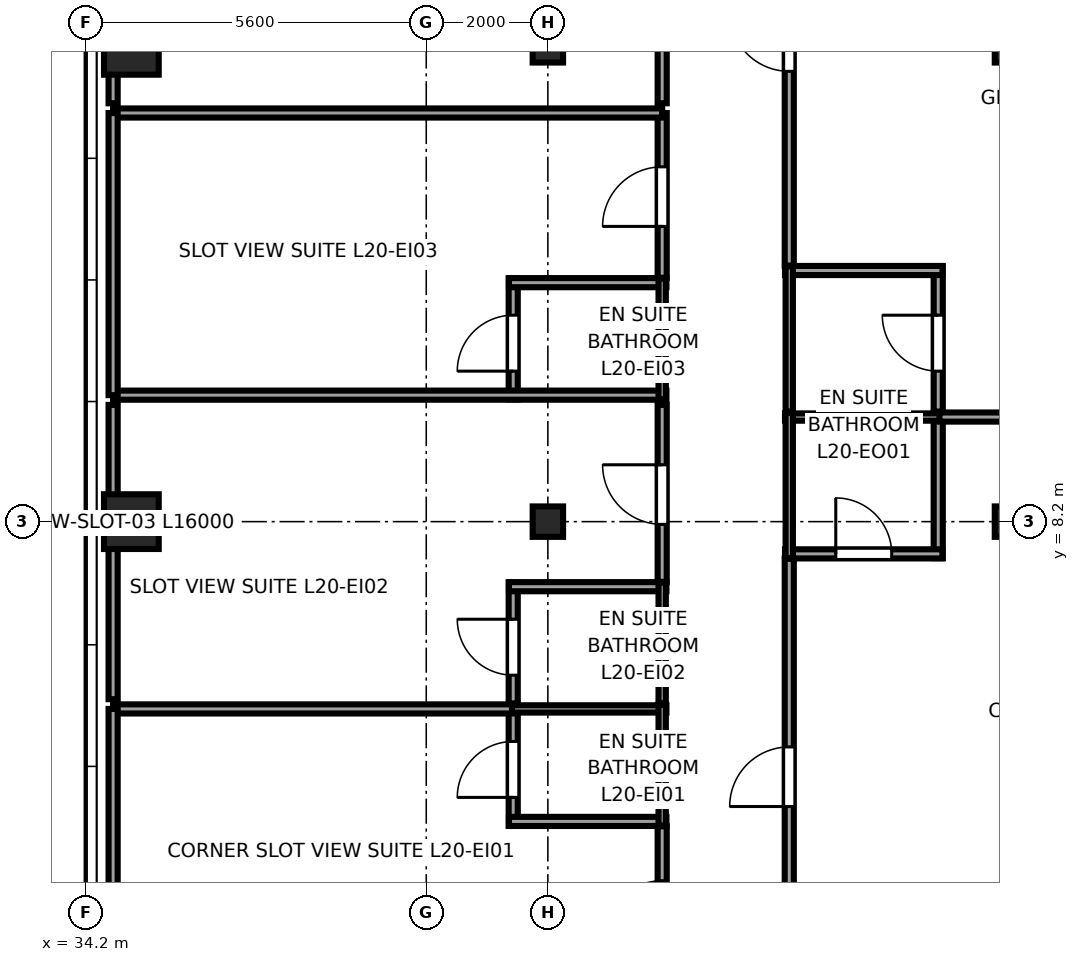
"""IFC4 building model, lengths in metres.
Left out: names, types, materials, properties, quantities, classifications, styles, units other than length and angle.
Written with IfcOpenShell. Run it as: python <this file> out.ifc"""

import sys

from ifc_helpers import new_model, si_unit, direction, frame, frame_2d, origin, origin_2d, place, context, subcontext, project, spatial, rectangle, i_section, extrude, source, transform, mapped, element, fill, save


model = new_model("IFC4")
c1 = context("Model", 3, precision=1e-05, world=origin(), true_north=direction((0.0, 1.0)))
c2 = subcontext(c1, "Body", "Model", "MODEL_VIEW")
j1 = project(units=[si_unit("LENGTHUNIT", "METRE"), si_unit("PLANEANGLEUNIT", "RADIAN")], contexts=[c1])
p1 = place(None, origin())
s1 = spatial("IfcSite", under=j1, at=p1, CompositionType="ELEMENT")
p2 = place(p1, origin())
s2 = spatial("IfcBuilding", under=s1, at=p2, CompositionType="ELEMENT")
p3 = place(p2, frame((0.0, 0.0, 81.7)))
s3 = spatial("IfcBuildingStorey", under=s2, at=p3, CompositionType="ELEMENT", Elevation=81.7)
m1 = source(origin(), c2, "Body", "SweptSolid", [
    extrude(rectangle(XDim=0.9, YDim=0.9, at=origin_2d()), origin(), (0.0, 0.0, 1.0), 3.55),
])
for number, where, z_axis, x_axis in (
    (1, (34.95, 8.2, 0.0), (0.0, 0.0, 1.0), (1.0, 0.0, 0.0)),
    (2, (34.95, 16.0, 0.0), (0.0, 0.0, 1.0), (1.0, 0.0, 0.0)),
):
    element("IfcColumn", number, at=place(p3, frame(where, z_axis=z_axis, x_axis=x_axis)), inside=s3, PredefinedType="COLUMN", context=c2, shape_type="MappedRepresentation", body=[
        mapped(m1, transform((0.0, 0.0, 0.0), x_axis=(1.0, 0.0, 0.0), y_axis=(0.0, 1.0, 0.0), z_axis=(0.0, 0.0, 1.0), scale=1.0)),
    ])
m2 = source(origin(), c2, "Body", "SweptSolid", [
    extrude(i_section(OverallWidth=0.5, OverallDepth=0.5, WebThickness=0.022, FlangeThickness=0.034, at=origin_2d()), origin(), (0.0, 0.0, 1.0), 3.55),
])
for number, where, z_axis, x_axis in (
    (3, (41.8, 8.2, 0.0), (0.0, 0.0, 1.0), (1.0, 0.0, 0.0)),
    (4, (41.8, 16.0, 0.0), (0.0, 0.0, 1.0), (1.0, 0.0, 0.0)),
    (5, (49.4, 8.2, 0.0), (0.0, 0.0, 1.0), (1.0, 0.0, 0.0)),
    (6, (49.4, 16.0, 0.0), (0.0, 0.0, 1.0), (1.0, 0.0, 0.0)),
):
    element("IfcColumn", number, at=place(p3, frame(where, z_axis=z_axis, x_axis=x_axis)), inside=s3, PredefinedType="COLUMN", context=c2, shape_type="MappedRepresentation", body=[
        mapped(m2, transform((0.0, 0.0, 0.0), x_axis=(1.0, 0.0, 0.0), y_axis=(0.0, 1.0, 0.0), z_axis=(0.0, 0.0, 1.0), scale=1.0)),
    ])
p4 = place(p3, frame((41.23, 3.2, 0.0), z_axis=(0.0, 0.0, 1.0), x_axis=(0.0, 1.0, 0.0)))
e7 = element("IfcWall", 7, at=p4, inside=s3, PredefinedType="PARTITIONING", context=c2, shape_type="SweptSolid", body=[
    extrude(rectangle(XDim=1.99, YDim=0.15, at=frame_2d((0.995, 0.0))), origin(), (0.0, 0.0, 1.0), 3.37),
])
p5 = place(p4, frame((0.465, 0.0, 0.0)))
e8 = element("IfcOpeningElement", 8, at=p5, cuts=e7, PredefinedType="OPENING", context=c2, shape_type="SweptSolid", body=[
    extrude(rectangle(XDim=0.92, YDim=2.01, at=frame_2d((0.46, 1.005))), frame((0.0, 0.085, 0.0), z_axis=(0.0, -1.0, 0.0), x_axis=(1.0, 0.0, 0.0)), (0.0, 0.0, 1.0), 0.17),
])
p6 = place(p3, frame((41.16, 3.27, 0.0), z_axis=(0.0, 0.0, 1.0), x_axis=(1.0, 0.0, 0.0)))
e9 = element("IfcWall", 9, at=p6, inside=s3, PredefinedType="PARTITIONING", context=c2, shape_type="SweptSolid", body=[
    extrude(rectangle(XDim=2.59, YDim=0.15, at=frame_2d((1.295, 0.0))), origin(), (0.0, 0.0, 1.0), 3.37),
])
p7 = place(p3, frame((41.16, 5.12, 0.0), z_axis=(0.0, 0.0, 1.0), x_axis=(1.0, 0.0, 0.0)))
e10 = element("IfcWall", 10, at=p7, inside=s3, PredefinedType="PLUMBINGWALL", context=c2, shape_type="SweptSolid", body=[
    extrude(rectangle(XDim=2.59, YDim=0.12, at=frame_2d((1.295, 0.0))), origin(), (0.0, 0.0, 1.0), 3.37),
])
p8 = place(p3, frame((43.68, 3.2, 0.0), z_axis=(0.0, 0.0, 1.0), x_axis=(0.0, 1.0, 0.0)))
e11 = element("IfcWall", 11, at=p8, inside=s3, PredefinedType="PLUMBINGWALL", context=c2, shape_type="SweptSolid", body=[
    extrude(rectangle(XDim=1.99, YDim=0.12, at=frame_2d((0.995, 0.0))), origin(), (0.0, 0.0, 1.0), 3.37),
])
p9 = place(p3, frame((41.23, 5.21, 0.0), z_axis=(0.0, 0.0, 1.0), x_axis=(0.0, 1.0, 0.0)))
e12 = element("IfcWall", 12, at=p9, inside=s3, PredefinedType="PARTITIONING", context=c2, shape_type="SweptSolid", body=[
    extrude(rectangle(XDim=1.99, YDim=0.15, at=frame_2d((0.995, 0.0))), origin(), (0.0, 0.0, 1.0), 3.37),
])
p10 = place(p9, frame((0.465, 0.0, 0.0)))
e13 = element("IfcOpeningElement", 13, at=p10, cuts=e12, PredefinedType="OPENING", context=c2, shape_type="SweptSolid", body=[
    extrude(rectangle(XDim=0.92, YDim=2.01, at=frame_2d((0.46, 1.005))), frame((0.0, 0.085, 0.0), z_axis=(0.0, -1.0, 0.0), x_axis=(1.0, 0.0, 0.0)), (0.0, 0.0, 1.0), 0.17),
])
p11 = place(p3, frame((41.16, 7.13, 0.0), z_axis=(0.0, 0.0, 1.0), x_axis=(1.0, 0.0, 0.0)))
e14 = element("IfcWall", 14, at=p11, inside=s3, PredefinedType="PARTITIONING", context=c2, shape_type="SweptSolid", body=[
    extrude(rectangle(XDim=2.59, YDim=0.15, at=frame_2d((1.295, 0.0))), origin(), (0.0, 0.0, 1.0), 3.37),
])
p12 = place(p3, frame((43.68, 5.21, 0.0), z_axis=(0.0, 0.0, 1.0), x_axis=(0.0, 1.0, 0.0)))
e15 = element("IfcWall", 15, at=p12, inside=s3, PredefinedType="PLUMBINGWALL", context=c2, shape_type="SweptSolid", body=[
    extrude(rectangle(XDim=1.99, YDim=0.12, at=frame_2d((0.995, 0.0))), origin(), (0.0, 0.0, 1.0), 3.37),
])
p13 = place(p3, frame((41.23, 10.21, 0.0), z_axis=(0.0, 0.0, 1.0), x_axis=(0.0, 1.0, 0.0)))
e16 = element("IfcWall", 16, at=p13, inside=s3, PredefinedType="PARTITIONING", context=c2, shape_type="SweptSolid", body=[
    extrude(rectangle(XDim=1.99, YDim=0.15, at=frame_2d((0.995, 0.0))), origin(), (0.0, 0.0, 1.0), 3.37),
])
p14 = place(p13, frame((0.465, 0.0, 0.0)))
e17 = element("IfcOpeningElement", 17, at=p14, cuts=e16, PredefinedType="OPENING", context=c2, shape_type="SweptSolid", body=[
    extrude(rectangle(XDim=0.92, YDim=2.01, at=frame_2d((0.46, 1.005))), frame((0.0, 0.085, 0.0), z_axis=(0.0, -1.0, 0.0), x_axis=(1.0, 0.0, 0.0)), (0.0, 0.0, 1.0), 0.17),
])
p15 = place(p3, frame((34.65, 10.28, 0.0), z_axis=(0.0, 0.0, 1.0), x_axis=(1.0, 0.0, 0.0)))
e18 = element("IfcWall", 18, at=p15, inside=s3, PredefinedType="PARTITIONING", context=c2, shape_type="SweptSolid", body=[
    extrude(rectangle(XDim=9.1, YDim=0.15, at=frame_2d((4.55, 0.0))), origin(), (0.0, 0.0, 1.0), 3.37),
])
p16 = place(p3, frame((41.16, 12.13, 0.0), z_axis=(0.0, 0.0, 1.0), x_axis=(1.0, 0.0, 0.0)))
e19 = element("IfcWall", 19, at=p16, inside=s3, PredefinedType="PARTITIONING", context=c2, shape_type="SweptSolid", body=[
    extrude(rectangle(XDim=2.59, YDim=0.15, at=frame_2d((1.295, 0.0))), origin(), (0.0, 0.0, 1.0), 3.37),
])
p17 = place(p3, frame((43.68, 10.21, 0.0), z_axis=(0.0, 0.0, 1.0), x_axis=(0.0, 1.0, 0.0)))
e20 = element("IfcWall", 20, at=p17, inside=s3, PredefinedType="PLUMBINGWALL", context=c2, shape_type="SweptSolid", body=[
    extrude(rectangle(XDim=1.99, YDim=0.12, at=frame_2d((0.995, 0.0))), origin(), (0.0, 0.0, 1.0), 3.37),
])
p18 = place(p3, frame((48.22, 7.6, 0.0), z_axis=(0.0, 0.0, 1.0), x_axis=(0.0, 1.0, 0.0)))
e21 = element("IfcWall", 21, at=p18, inside=s3, PredefinedType="PARTITIONING", context=c2, shape_type="SweptSolid", body=[
    extrude(rectangle(XDim=2.39, YDim=0.15, at=frame_2d((1.195, 0.0))), origin(), (0.0, 0.0, 1.0), 3.37),
])
p19 = place(p3, frame((45.7, 7.67, 0.0), z_axis=(0.0, 0.0, 1.0), x_axis=(1.0, 0.0, 0.0)))
e22 = element("IfcWall", 22, at=p19, inside=s3, PredefinedType="PARTITIONING", context=c2, shape_type="SweptSolid", body=[
    extrude(rectangle(XDim=2.59, YDim=0.15, at=frame_2d((1.295, 0.0))), origin(), (0.0, 0.0, 1.0), 3.37),
])
p20 = place(p19, frame((0.835, 0.0, 0.0)))
e23 = element("IfcOpeningElement", 23, at=p20, cuts=e22, PredefinedType="OPENING", context=c2, shape_type="SweptSolid", body=[
    extrude(rectangle(XDim=0.92, YDim=2.01, at=frame_2d((0.46, 1.005))), frame((0.0, 0.085, 0.0), z_axis=(0.0, -1.0, 0.0), x_axis=(1.0, 0.0, 0.0)), (0.0, 0.0, 1.0), 0.17),
])
p21 = place(p3, frame((45.7, 9.92, 0.0), z_axis=(0.0, 0.0, 1.0), x_axis=(1.0, 0.0, 0.0)))
e24 = element("IfcWall", 24, at=p21, inside=s3, PredefinedType="PLUMBINGWALL", context=c2, shape_type="SweptSolid", body=[
    extrude(rectangle(XDim=2.59, YDim=0.12, at=frame_2d((1.295, 0.0))), origin(), (0.0, 0.0, 1.0), 3.37),
])
p22 = place(p3, frame((45.77, 7.6, 0.0), z_axis=(0.0, 0.0, 1.0), x_axis=(0.0, 1.0, 0.0)))
e25 = element("IfcWall", 25, at=p22, inside=s3, PredefinedType="PLUMBINGWALL", context=c2, shape_type="SweptSolid", body=[
    extrude(rectangle(XDim=2.39, YDim=0.12, at=frame_2d((1.195, 0.0))), origin(), (0.0, 0.0, 1.0), 3.37),
])
p23 = place(p3, frame((48.22, 10.01, 0.0), z_axis=(0.0, 0.0, 1.0), x_axis=(0.0, 1.0, 0.0)))
e26 = element("IfcWall", 26, at=p23, inside=s3, PredefinedType="PARTITIONING", context=c2, shape_type="SweptSolid", body=[
    extrude(rectangle(XDim=2.39, YDim=0.15, at=frame_2d((1.195, 0.0))), origin(), (0.0, 0.0, 1.0), 3.37),
])
p24 = place(p23, frame((0.665, 0.0, 0.0)))
e27 = element("IfcOpeningElement", 27, at=p24, cuts=e26, PredefinedType="OPENING", context=c2, shape_type="SweptSolid", body=[
    extrude(rectangle(XDim=0.92, YDim=2.01, at=frame_2d((0.46, 1.005))), frame((0.0, 0.085, 0.0), z_axis=(0.0, -1.0, 0.0), x_axis=(1.0, 0.0, 0.0)), (0.0, 0.0, 1.0), 0.17),
])
p25 = place(p3, frame((45.7, 12.33, 0.0), z_axis=(0.0, 0.0, 1.0), x_axis=(1.0, 0.0, 0.0)))
e28 = element("IfcWall", 28, at=p25, inside=s3, PredefinedType="PARTITIONING", context=c2, shape_type="SweptSolid", body=[
    extrude(rectangle(XDim=2.59, YDim=0.15, at=frame_2d((1.295, 0.0))), origin(), (0.0, 0.0, 1.0), 3.37),
])
p26 = place(p3, frame((45.77, 10.01, 0.0), z_axis=(0.0, 0.0, 1.0), x_axis=(0.0, 1.0, 0.0)))
e29 = element("IfcWall", 29, at=p26, inside=s3, PredefinedType="PLUMBINGWALL", context=c2, shape_type="SweptSolid", body=[
    extrude(rectangle(XDim=2.39, YDim=0.12, at=frame_2d((1.195, 0.0))), origin(), (0.0, 0.0, 1.0), 3.37),
])
p27 = place(p3, frame((43.68, 0.405, 0.0), z_axis=(0.0, 0.0, 1.0), x_axis=(0.0, 1.0, 0.0)))
e30 = element("IfcWall", 30, at=p27, inside=s3, PredefinedType="PARTITIONING", context=c2, shape_type="SweptSolid", body=[
    extrude(rectangle(XDim=2.785, YDim=0.15, at=frame_2d((1.393, 0.0))), origin(), (0.0, 0.0, 1.0), 3.37),
])
p28 = place(p27, frame((0.91, 0.0, 0.0)))
e31 = element("IfcOpeningElement", 31, at=p28, cuts=e30, PredefinedType="OPENING", context=c2, shape_type="SweptSolid", body=[
    extrude(rectangle(XDim=0.98, YDim=2.12, at=frame_2d((0.49, 1.06))), frame((0.0, 0.085, 0.0), z_axis=(0.0, -1.0, 0.0), x_axis=(1.0, 0.0, 0.0)), (0.0, 0.0, 1.0), 0.17),
])
p29 = place(p3, frame((34.65, 5.12, 0.0), z_axis=(0.0, 0.0, 1.0), x_axis=(1.0, 0.0, 0.0)))
e32 = element("IfcWall", 32, at=p29, inside=s3, PredefinedType="PARTITIONING", context=c2, shape_type="SweptSolid", body=[
    extrude(rectangle(XDim=6.56, YDim=0.15, at=frame_2d((3.28, 0.0))), origin(), (0.0, 0.0, 1.0), 3.37),
])
p30 = place(p3, frame((34.65, 0.405, 0.0), z_axis=(0.0, 0.0, 1.0), x_axis=(0.0, 1.0, 0.0)))
e33 = element("IfcWall", 33, at=p30, inside=s3, PredefinedType="PARTITIONING", context=c2, shape_type="SweptSolid", body=[
    extrude(rectangle(XDim=4.715, YDim=0.15, at=frame_2d((2.357, 0.0))), origin(), (0.0, 0.0, 1.0), 3.37),
])
p31 = place(p3, frame((43.68, 7.21, 0.0), z_axis=(0.0, 0.0, 1.0), x_axis=(0.0, 1.0, 0.0)))
e34 = element("IfcWall", 34, at=p31, inside=s3, PredefinedType="PARTITIONING", context=c2, shape_type="SweptSolid", body=[
    extrude(rectangle(XDim=2.91, YDim=0.15, at=frame_2d((1.455, 0.0))), origin(), (0.0, 0.0, 1.0), 3.37),
])
p32 = place(p31, frame((0.945, 0.0, 0.0)))
e35 = element("IfcOpeningElement", 35, at=p32, cuts=e34, PredefinedType="OPENING", context=c2, shape_type="SweptSolid", body=[
    extrude(rectangle(XDim=0.98, YDim=2.12, at=frame_2d((0.49, 1.06))), frame((0.0, 0.085, 0.0), z_axis=(0.0, -1.0, 0.0), x_axis=(1.0, 0.0, 0.0)), (0.0, 0.0, 1.0), 0.17),
])
p33 = place(p3, frame((34.65, 5.28, 0.0), z_axis=(0.0, 0.0, 1.0), x_axis=(0.0, 1.0, 0.0)))
e36 = element("IfcWall", 36, at=p33, inside=s3, PredefinedType="PARTITIONING", context=c2, shape_type="SweptSolid", body=[
    extrude(rectangle(XDim=4.84, YDim=0.15, at=frame_2d((2.42, 0.0))), origin(), (0.0, 0.0, 1.0), 3.37),
])
p34 = place(p3, frame((43.68, 12.21, 0.0), z_axis=(0.0, 0.0, 1.0), x_axis=(0.0, 1.0, 0.0)))
e37 = element("IfcWall", 37, at=p34, inside=s3, PredefinedType="PARTITIONING", context=c2, shape_type="SweptSolid", body=[
    extrude(rectangle(XDim=2.71, YDim=0.15, at=frame_2d((1.355, 0.0))), origin(), (0.0, 0.0, 1.0), 3.37),
])
p35 = place(p34, frame((0.845, 0.0, 0.0)))
e38 = element("IfcOpeningElement", 38, at=p35, cuts=e37, PredefinedType="OPENING", context=c2, shape_type="SweptSolid", body=[
    extrude(rectangle(XDim=0.98, YDim=2.12, at=frame_2d((0.49, 1.06))), frame((0.0, 0.085, 0.0), z_axis=(0.0, -1.0, 0.0), x_axis=(1.0, 0.0, 0.0)), (0.0, 0.0, 1.0), 0.17),
])
p36 = place(p3, frame((34.65, 14.92, 0.0), z_axis=(0.0, 0.0, 1.0), x_axis=(1.0, 0.0, 0.0)))
e39 = element("IfcWall", 39, at=p36, inside=s3, PredefinedType="PARTITIONING", context=c2, shape_type="SweptSolid", body=[
    extrude(rectangle(XDim=9.03, YDim=0.15, at=frame_2d((4.515, 0.0))), origin(), (0.0, 0.0, 1.0), 3.37),
])
p37 = place(p3, frame((34.65, 10.28, 0.0), z_axis=(0.0, 0.0, 1.0), x_axis=(0.0, 1.0, 0.0)))
e40 = element("IfcWall", 40, at=p37, inside=s3, PredefinedType="PARTITIONING", context=c2, shape_type="SweptSolid", body=[
    extrude(rectangle(XDim=4.64, YDim=0.15, at=frame_2d((2.32, 0.0))), origin(), (0.0, 0.0, 1.0), 3.37),
])
p38 = place(p3, frame((43.68, 15.08, 0.0), z_axis=(0.0, 0.0, 1.0), x_axis=(0.0, 1.0, 0.0)))
e41 = element("IfcWall", 41, at=p38, inside=s3, PredefinedType="PARTITIONING", context=c2, shape_type="SweptSolid", body=[
    extrude(rectangle(XDim=2.81, YDim=0.15, at=frame_2d((1.405, 0.0))), origin(), (0.0, 0.0, 1.0), 3.37),
])
p39 = place(p38, frame((0.895, 0.0, 0.0)))
e42 = element("IfcOpeningElement", 42, at=p39, cuts=e41, PredefinedType="OPENING", context=c2, shape_type="SweptSolid", body=[
    extrude(rectangle(XDim=0.98, YDim=2.12, at=frame_2d((0.49, 1.06))), frame((0.0, 0.085, 0.0), z_axis=(0.0, -1.0, 0.0), x_axis=(1.0, 0.0, 0.0)), (0.0, 0.0, 1.0), 0.17),
])
p40 = place(p3, frame((34.65, 15.08, 0.0), z_axis=(0.0, 0.0, 1.0), x_axis=(0.0, 1.0, 0.0)))
e43 = element("IfcWall", 43, at=p40, inside=s3, PredefinedType="PARTITIONING", context=c2, shape_type="SweptSolid", body=[
    extrude(rectangle(XDim=4.74, YDim=0.15, at=frame_2d((2.37, 0.0))), origin(), (0.0, 0.0, 1.0), 3.37),
])
p41 = place(p3, frame((45.77, 0.405, 0.0), z_axis=(0.0, 0.0, 1.0), x_axis=(0.0, 1.0, 0.0)))
e44 = element("IfcWall", 44, at=p41, inside=s3, PredefinedType="PARTITIONING", context=c2, shape_type="SweptSolid", body=[
    extrude(rectangle(XDim=7.185, YDim=0.15, at=frame_2d((3.593, 0.0))), origin(), (0.0, 0.0, 1.0), 3.37),
])
p42 = place(p41, frame((3.11, 0.0, 0.0)))
e45 = element("IfcOpeningElement", 45, at=p42, cuts=e44, PredefinedType="OPENING", context=c2, shape_type="SweptSolid", body=[
    extrude(rectangle(XDim=0.98, YDim=2.12, at=frame_2d((0.49, 1.06))), frame((0.0, 0.085, 0.0), z_axis=(0.0, -1.0, 0.0), x_axis=(1.0, 0.0, 0.0)), (0.0, 0.0, 1.0), 0.17),
])
p43 = place(p3, frame((48.24, 9.92, 0.0), z_axis=(0.0, 0.0, 1.0), x_axis=(1.0, 0.0, 0.0)))
e46 = element("IfcWall", 46, at=p43, inside=s3, PredefinedType="PARTITIONING", context=c2, shape_type="SweptSolid", body=[
    extrude(rectangle(XDim=8.355, YDim=0.15, at=frame_2d((4.177, 0.0))), origin(), (0.0, 0.0, 1.0), 3.37),
])
p44 = place(p3, frame((45.77, 12.41, 0.0), z_axis=(0.0, 0.0, 1.0), x_axis=(0.0, 1.0, 0.0)))
e47 = element("IfcWall", 47, at=p44, inside=s3, PredefinedType="PARTITIONING", context=c2, shape_type="SweptSolid", body=[
    extrude(rectangle(XDim=7.41, YDim=0.15, at=frame_2d((3.705, 0.0))), origin(), (0.0, 0.0, 1.0), 3.37),
])
p45 = place(p44, frame((3.195, 0.0, 0.0)))
e48 = element("IfcOpeningElement", 48, at=p45, cuts=e47, PredefinedType="OPENING", context=c2, shape_type="SweptSolid", body=[
    extrude(rectangle(XDim=0.98, YDim=2.12, at=frame_2d((0.49, 1.06))), frame((0.0, 0.085, 0.0), z_axis=(0.0, -1.0, 0.0), x_axis=(1.0, 0.0, 0.0)), (0.0, 0.0, 1.0), 0.17),
])
m3 = source(origin(), c2, "Body", "SweptSolid", [
    extrude(rectangle(XDim=0.92, YDim=2.01, at=frame_2d((0.46, 1.005))), frame((0.0, 0.025, 0.0), z_axis=(0.0, -1.0, 0.0), x_axis=(1.0, 0.0, 0.0)), (0.0, 0.0, 1.0), 0.05),
])
p46 = place(p5, origin())
e49 = element("IfcDoor", 49, at=p46, inside=s3, OperationType="SINGLE_SWING_LEFT", PredefinedType="DOOR", context=c2, shape_type="MappedRepresentation", body=[
    mapped(m3, transform((0.0, 0.0, 0.0), x_axis=(1.0, 0.0, 0.0), y_axis=(0.0, 1.0, 0.0), z_axis=(0.0, 0.0, 1.0), scale=1.0)),
])
fill(e8, e49)
p47 = place(p10, origin())
e50 = element("IfcDoor", 50, at=p47, inside=s3, OperationType="SINGLE_SWING_RIGHT", PredefinedType="DOOR", context=c2, shape_type="MappedRepresentation", body=[
    mapped(m3, transform((0.0, 0.0, 0.0), x_axis=(1.0, 0.0, 0.0), y_axis=(0.0, 1.0, 0.0), z_axis=(0.0, 0.0, 1.0), scale=1.0)),
])
fill(e13, e50)
p48 = place(p14, origin())
e51 = element("IfcDoor", 51, at=p48, inside=s3, OperationType="SINGLE_SWING_LEFT", PredefinedType="DOOR", context=c2, shape_type="MappedRepresentation", body=[
    mapped(m3, transform((0.0, 0.0, 0.0), x_axis=(1.0, 0.0, 0.0), y_axis=(0.0, 1.0, 0.0), z_axis=(0.0, 0.0, 1.0), scale=1.0)),
])
fill(e17, e51)
p49 = place(p20, origin())
e52 = element("IfcDoor", 52, at=p49, inside=s3, OperationType="SINGLE_SWING_LEFT", PredefinedType="DOOR", context=c2, shape_type="MappedRepresentation", body=[
    mapped(m3, transform((0.0, 0.0, 0.0), x_axis=(1.0, 0.0, 0.0), y_axis=(0.0, 1.0, 0.0), z_axis=(0.0, 0.0, 1.0), scale=1.0)),
])
fill(e23, e52)
p50 = place(p24, origin())
e53 = element("IfcDoor", 53, at=p50, inside=s3, OperationType="SINGLE_SWING_RIGHT", PredefinedType="DOOR", context=c2, shape_type="MappedRepresentation", body=[
    mapped(m3, transform((0.0, 0.0, 0.0), x_axis=(1.0, 0.0, 0.0), y_axis=(0.0, 1.0, 0.0), z_axis=(0.0, 0.0, 1.0), scale=1.0)),
])
fill(e27, e53)
m4 = source(origin(), c2, "Body", "SweptSolid", [
    extrude(rectangle(XDim=0.98, YDim=2.12, at=frame_2d((0.49, 1.06))), frame((0.0, 0.025, 0.0), z_axis=(0.0, -1.0, 0.0), x_axis=(1.0, 0.0, 0.0)), (0.0, 0.0, 1.0), 0.05),
])
p51 = place(p28, origin())
e54 = element("IfcDoor", 54, at=p51, inside=s3, OperationType="SINGLE_SWING_LEFT", PredefinedType="DOOR", context=c2, shape_type="MappedRepresentation", body=[
    mapped(m4, transform((0.0, 0.0, 0.0), x_axis=(1.0, 0.0, 0.0), y_axis=(0.0, 1.0, 0.0), z_axis=(0.0, 0.0, 1.0), scale=1.0)),
])
fill(e31, e54)
p52 = place(p32, origin())
e55 = element("IfcDoor", 55, at=p52, inside=s3, OperationType="SINGLE_SWING_RIGHT", PredefinedType="DOOR", context=c2, shape_type="MappedRepresentation", body=[
    mapped(m4, transform((0.0, 0.0, 0.0), x_axis=(1.0, 0.0, 0.0), y_axis=(0.0, 1.0, 0.0), z_axis=(0.0, 0.0, 1.0), scale=1.0)),
])
fill(e35, e55)
p53 = place(p35, origin())
e56 = element("IfcDoor", 56, at=p53, inside=s3, OperationType="SINGLE_SWING_LEFT", PredefinedType="DOOR", context=c2, shape_type="MappedRepresentation", body=[
    mapped(m4, transform((0.0, 0.0, 0.0), x_axis=(1.0, 0.0, 0.0), y_axis=(0.0, 1.0, 0.0), z_axis=(0.0, 0.0, 1.0), scale=1.0)),
])
fill(e38, e56)
p54 = place(p42, origin())
e57 = element("IfcDoor", 57, at=p54, inside=s3, OperationType="SINGLE_SWING_LEFT", PredefinedType="DOOR", context=c2, shape_type="MappedRepresentation", body=[
    mapped(m4, transform((0.0, 0.0, 0.0), x_axis=(1.0, 0.0, 0.0), y_axis=(0.0, 1.0, 0.0), z_axis=(0.0, 0.0, 1.0), scale=1.0)),
])
fill(e45, e57)
p55 = place(p45, origin())
e58 = element("IfcDoor", 58, at=p55, inside=s3, OperationType="SINGLE_SWING_RIGHT", PredefinedType="DOOR", context=c2, shape_type="MappedRepresentation", body=[
    mapped(m4, transform((0.0, 0.0, 0.0), x_axis=(1.0, 0.0, 0.0), y_axis=(0.0, 1.0, 0.0), z_axis=(0.0, 0.0, 1.0), scale=1.0)),
])
fill(e48, e58)
save(model, sys.argv[1])
